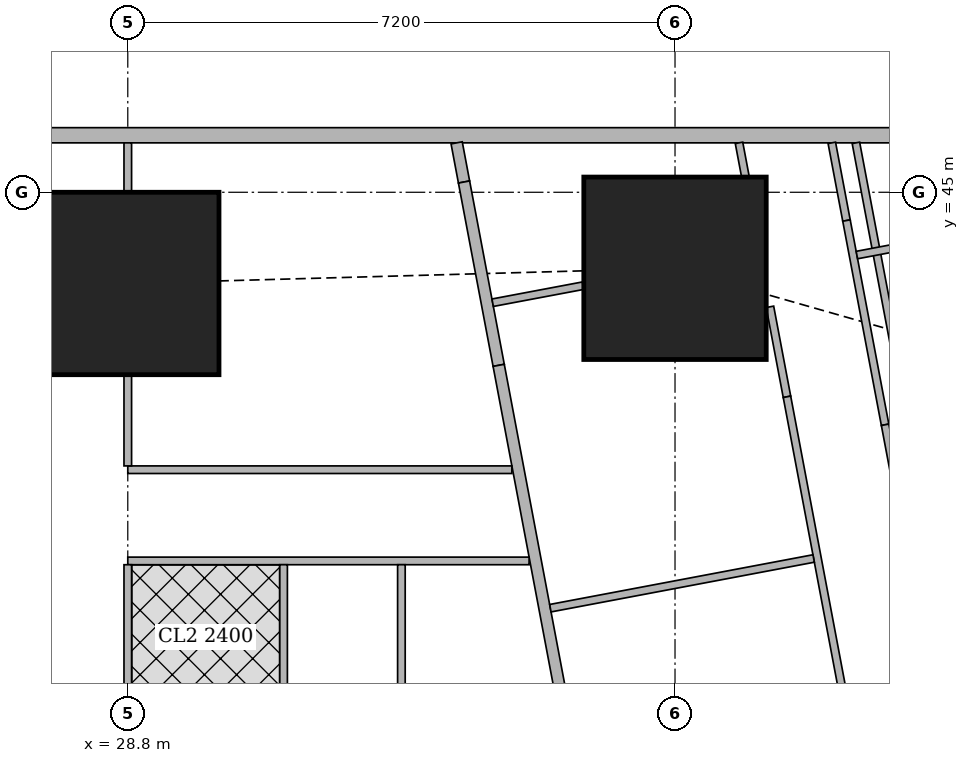
"""IFC4 building model, lengths in metres.
Left out: names, types, materials, properties, quantities, classifications, styles, units other than length and angle.
Written with IfcOpenShell. Run it as: python <this file> out.ifc"""

import sys

from ifc_helpers import new_model, si_unit, direction, frame, frame_2d, origin, origin_2d, place, context, subcontext, project, spatial, rectangle, extrude, element, fill, save


model = new_model("IFC4")
c1 = context("Model", 3, precision=1e-05, world=origin(), true_north=direction((0.0, 1.0)))
c2 = subcontext(c1, "Body", "Model", "MODEL_VIEW")
j1 = project(units=[si_unit("LENGTHUNIT", "METRE"), si_unit("PLANEANGLEUNIT", "RADIAN")], contexts=[c1])
p1 = place(None, origin())
s1 = spatial("IfcSite", under=j1, at=p1, CompositionType="ELEMENT")
p2 = place(p1, origin())
s2 = spatial("IfcBuilding", under=s1, at=p2, CompositionType="ELEMENT")
p3 = place(p2, frame((0.0, 0.0, 223.7)))
s3 = spatial("IfcBuildingStorey", under=s2, at=p3, CompositionType="ELEMENT", Elevation=223.7)
for number, where, z_axis, x_axis in (
    (1, (28.8, 43.8, 0.0), (0.0, 0.0, 1.0), (1.0, 0.0, 0.0)),
    (2, (36.0, 44.0, 0.0), (0.0, 0.0, 1.0), (1.0, 0.0, 0.0)),
):
    element("IfcColumn", number, at=place(p3, frame(where, z_axis=z_axis, x_axis=x_axis)), inside=s3, PredefinedType="COLUMN", context=c2, shape_type="SweptSolid", body=[
        extrude(rectangle(XDim=2.4, YDim=2.4, at=origin_2d()), origin(), (0.0, 0.0, 1.0), 3.75),
    ])
p4 = place(p3, frame((40.106, 45.75, 0.0), z_axis=(0.0, 0.0, 1.0), x_axis=(-1.0, 0.0, 0.0)))
e3 = element("IfcWall", 3, at=p4, inside=s3, PredefinedType="SOLIDWALL", context=c2, shape_type="SweptSolid", body=[
    extrude(rectangle(XDim=25.543, YDim=0.2, at=frame_2d((12.771, 0.0))), origin(), (0.0, 0.0, 1.0), 3.5),
])
p5 = place(p4, frame((8.606, 0.0, 0.9)))
e4 = element("IfcOpeningElement", 4, at=p5, cuts=e3, PredefinedType="OPENING", context=c2, shape_type="SweptSolid", body=[
    extrude(rectangle(XDim=1.8, YDim=1.5, at=frame_2d((0.9, 0.75))), frame((0.0, 0.11, 0.0), z_axis=(0.0, -1.0, 0.0), x_axis=(1.0, 0.0, 0.0)), (0.0, 0.0, 1.0), 0.22),
])
p6 = place(p4, frame((12.206, 0.0, 0.9)))
e5 = element("IfcOpeningElement", 5, at=p6, cuts=e3, PredefinedType="OPENING", context=c2, shape_type="SweptSolid", body=[
    extrude(rectangle(XDim=1.8, YDim=1.5, at=frame_2d((0.9, 0.75))), frame((0.0, 0.11, 0.0), z_axis=(0.0, -1.0, 0.0), x_axis=(1.0, 0.0, 0.0)), (0.0, 0.0, 1.0), 0.22),
])
p7 = place(p4, frame((15.806, 0.0, 0.9)))
e6 = element("IfcOpeningElement", 6, at=p7, cuts=e3, PredefinedType="OPENING", context=c2, shape_type="SweptSolid", body=[
    extrude(rectangle(XDim=1.8, YDim=1.5, at=frame_2d((0.9, 0.75))), frame((0.0, 0.11, 0.0), z_axis=(0.0, -1.0, 0.0), x_axis=(1.0, 0.0, 0.0)), (0.0, 0.0, 1.0), 0.22),
])
p8 = place(p4, frame((20.825, 0.0, 0.9)))
e7 = element("IfcOpeningElement", 7, at=p8, cuts=e3, PredefinedType="OPENING", context=c2, shape_type="SweptSolid", body=[
    extrude(rectangle(XDim=2.4, YDim=1.5, at=frame_2d((1.2, 0.75))), frame((0.0, 0.11, 0.0), z_axis=(0.0, -1.0, 0.0), x_axis=(1.0, 0.0, 0.0)), (0.0, 0.0, 1.0), 0.22),
])
p9 = place(p3, frame((33.127, 45.65, 0.0), z_axis=(0.0, 0.0, 1.0), x_axis=(0.185441815104, -0.982655246366, 0.0)))
e8 = element("IfcWall", 8, at=p9, inside=s3, PredefinedType="SOLIDWALL", context=c2, shape_type="SweptSolid", body=[
    extrude(rectangle(XDim=0.524, YDim=0.15, at=frame_2d((0.262, 0.0))), origin(), (0.0, 0.0, 1.0), 3.5),
])
p10 = place(p3, frame((33.224, 45.135, 0.0), z_axis=(0.0, 0.0, 1.0), x_axis=(0.185681462868, -0.982609990967, 0.0)))
e9 = element("IfcWall", 9, at=p10, inside=s3, PredefinedType="SOLIDWALL", context=c2, shape_type="SweptSolid", body=[
    extrude(rectangle(XDim=2.455, YDim=0.15, at=frame_2d((1.228, 0.0))), origin(), (0.0, 0.0, 1.0), 2.05),
])
p11 = place(p3, frame((33.68, 42.723, 0.0), z_axis=(0.0, 0.0, 1.0), x_axis=(0.185601160014, -0.982625162207, 0.0)))
e10 = element("IfcWall", 10, at=p11, inside=s3, PredefinedType="SOLIDWALL", context=c2, shape_type="SweptSolid", body=[
    extrude(rectangle(XDim=41.051, YDim=0.15, at=frame_2d((20.526, 0.0))), origin(), (0.0, 0.0, 1.0), 2.5),
])
p12 = place(p11, frame((16.123, 0.0, 0.0)))
e11 = element("IfcOpeningElement", 11, at=p12, cuts=e10, PredefinedType="OPENING", context=c2, shape_type="SweptSolid", body=[
    extrude(rectangle(XDim=1.0, YDim=2.1, at=frame_2d((0.5, 1.05))), frame((0.0, 0.085, 0.0), z_axis=(0.0, -1.0, 0.0), x_axis=(1.0, 0.0, 0.0)), (0.0, 0.0, 1.0), 0.17),
])
p13 = place(p11, frame((19.938, 0.0, 0.0)))
e12 = element("IfcOpeningElement", 12, at=p13, cuts=e10, PredefinedType="OPENING", context=c2, shape_type="SweptSolid", body=[
    extrude(rectangle(XDim=1.0, YDim=2.1, at=frame_2d((0.5, 1.05))), frame((0.0, 0.085, 0.0), z_axis=(0.0, -1.0, 0.0), x_axis=(1.0, 0.0, 0.0)), (0.0, 0.0, 1.0), 0.17),
])
p14 = place(p11, frame((30.902, 0.0, 0.0)))
e13 = element("IfcOpeningElement", 13, at=p14, cuts=e10, PredefinedType="OPENING", context=c2, shape_type="SweptSolid", body=[
    extrude(rectangle(XDim=1.0, YDim=2.1, at=frame_2d((0.5, 1.05))), frame((0.0, 0.085, 0.0), z_axis=(0.0, -1.0, 0.0), x_axis=(1.0, 0.0, 0.0)), (0.0, 0.0, 1.0), 0.17),
])
p15 = place(p3, frame((39.054, 42.085, 0.0), z_axis=(0.0, 0.0, 1.0), x_axis=(-0.185791584218, 0.982589175207, 0.0)))
e14 = element("IfcWall", 14, at=p15, inside=s3, PredefinedType="PARTITIONING", context=c2, shape_type="SweptSolid", body=[
    extrude(rectangle(XDim=3.628, YDim=0.1, at=frame_2d((1.814, 0.0))), origin(), (0.0, 0.0, 1.0), 2.05),
])
p16 = place(p3, frame((38.063, 45.65, 0.0), z_axis=(0.0, 0.0, 1.0), x_axis=(0.185677287841, -0.982610779902, 0.0)))
e15 = element("IfcWall", 15, at=p16, inside=s3, PredefinedType="PARTITIONING", context=c2, shape_type="SweptSolid", body=[
    extrude(rectangle(XDim=1.04, YDim=0.1, at=frame_2d((0.52, 0.0))), origin(), (0.0, 0.0, 1.0), 3.5),
])
p17 = place(p3, frame((38.256, 44.628, 0.0), z_axis=(0.0, 0.0, 1.0), x_axis=(0.185700639943, -0.982606366927, 0.0)))
e16 = element("IfcWall", 16, at=p17, inside=s3, PredefinedType="PARTITIONING", context=c2, shape_type="SweptSolid", body=[
    extrude(rectangle(XDim=2.735, YDim=0.1, at=frame_2d((1.367, 0.0))), origin(), (0.0, 0.0, 1.0), 2.05),
])
p18 = place(p3, frame((38.764, 41.941, 0.0), z_axis=(0.0, 0.0, 1.0), x_axis=(0.185512176227, -0.982641965556, 0.0)))
e17 = element("IfcWall", 17, at=p18, inside=s3, PredefinedType="PARTITIONING", context=c2, shape_type="SweptSolid", body=[
    extrude(rectangle(XDim=12.792, YDim=0.1, at=frame_2d((6.396, 0.0))), origin(), (0.0, 0.0, 1.0), 2.5),
])
p19 = place(p18, frame((11.35, 0.0, 0.0)))
e18 = element("IfcOpeningElement", 18, at=p19, cuts=e17, PredefinedType="OPENING", context=c2, shape_type="SweptSolid", body=[
    extrude(rectangle(XDim=0.9, YDim=2.1, at=frame_2d((0.45, 1.05))), frame((0.0, 0.06, 0.0), z_axis=(0.0, -1.0, 0.0), x_axis=(1.0, 0.0, 0.0)), (0.0, 0.0, 1.0), 0.12),
])
p20 = place(p18, frame((8.085, 0.0, 0.0)))
e19 = element("IfcOpeningElement", 19, at=p20, cuts=e17, PredefinedType="OPENING", context=c2, shape_type="SweptSolid", body=[
    extrude(rectangle(XDim=0.9, YDim=2.1, at=frame_2d((0.45, 1.05))), frame((0.0, 0.06, 0.0), z_axis=(0.0, -1.0, 0.0), x_axis=(1.0, 0.0, 0.0)), (0.0, 0.0, 1.0), 0.12),
])
p21 = place(p18, frame((3.7, 0.0, 0.0)))
e20 = element("IfcOpeningElement", 20, at=p21, cuts=e17, PredefinedType="OPENING", context=c2, shape_type="SweptSolid", body=[
    extrude(rectangle(XDim=0.9, YDim=2.1, at=frame_2d((0.45, 1.05))), frame((0.0, 0.06, 0.0), z_axis=(0.0, -1.0, 0.0), x_axis=(1.0, 0.0, 0.0)), (0.0, 0.0, 1.0), 0.12),
])
p22 = place(p3, frame((36.842, 45.65, 0.0), z_axis=(0.0, 0.0, 1.0), x_axis=(0.185407859198, -0.982661653748, 0.0)))
e21 = element("IfcWall", 21, at=p22, inside=s3, PredefinedType="PARTITIONING", context=c2, shape_type="SweptSolid", body=[
    extrude(rectangle(XDim=0.448, YDim=0.1, at=frame_2d((0.224, 0.0))), origin(), (0.0, 0.0, 1.0), 3.5),
])
p23 = place(p3, frame((37.249, 43.493, 0.0), z_axis=(0.0, 0.0, 1.0), x_axis=(0.185817643817, -0.982584247404, 0.0)))
e22 = element("IfcWall", 22, at=p23, inside=s3, PredefinedType="PARTITIONING", context=c2, shape_type="SweptSolid", body=[
    extrude(rectangle(XDim=1.205, YDim=0.1, at=frame_2d((0.603, 0.0))), origin(), (0.0, 0.0, 1.0), 2.05),
])
p24 = place(p3, frame((37.473, 42.309, 0.0), z_axis=(0.0, 0.0, 1.0), x_axis=(0.185570636839, -0.982630927024, 0.0)))
e23 = element("IfcWall", 23, at=p24, inside=s3, PredefinedType="PARTITIONING", context=c2, shape_type="SweptSolid", body=[
    extrude(rectangle(XDim=13.553, YDim=0.1, at=frame_2d((6.777, 0.0))), origin(), (0.0, 0.0, 1.0), 2.5),
])
p25 = place(p24, frame((12.128, 0.0, 0.0)))
e24 = element("IfcOpeningElement", 24, at=p25, cuts=e23, PredefinedType="OPENING", context=c2, shape_type="SweptSolid", body=[
    extrude(rectangle(XDim=0.9, YDim=2.1, at=frame_2d((0.45, 1.05))), frame((0.0, 0.06, 0.0), z_axis=(0.0, -1.0, 0.0), x_axis=(1.0, 0.0, 0.0)), (0.0, 0.0, 1.0), 0.12),
])
p26 = place(p24, frame((8.487, 0.0, 0.0)))
e25 = element("IfcOpeningElement", 25, at=p26, cuts=e23, PredefinedType="OPENING", context=c2, shape_type="SweptSolid", body=[
    extrude(rectangle(XDim=0.9, YDim=2.1, at=frame_2d((0.45, 1.05))), frame((0.0, 0.06, 0.0), z_axis=(0.0, -1.0, 0.0), x_axis=(1.0, 0.0, 0.0)), (0.0, 0.0, 1.0), 0.12),
])
p27 = place(p24, frame((2.853, 0.0, 0.0)))
e26 = element("IfcOpeningElement", 26, at=p27, cuts=e23, PredefinedType="OPENING", context=c2, shape_type="SweptSolid", body=[
    extrude(rectangle(XDim=0.9, YDim=2.1, at=frame_2d((0.45, 1.05))), frame((0.0, 0.06, 0.0), z_axis=(0.0, -1.0, 0.0), x_axis=(1.0, 0.0, 0.0)), (0.0, 0.0, 1.0), 0.12),
])
p28 = place(p24, frame((10.22, 0.0, 0.0)))
e27 = element("IfcOpeningElement", 27, at=p28, cuts=e23, PredefinedType="OPENING", context=c2, shape_type="SweptSolid", body=[
    extrude(rectangle(XDim=0.9, YDim=2.1, at=frame_2d((0.45, 1.05))), frame((0.0, 0.06, 0.0), z_axis=(0.0, -1.0, 0.0), x_axis=(1.0, 0.0, 0.0)), (0.0, 0.0, 1.0), 0.12),
])
p29 = place(p24, frame((5.819, 0.0, 0.0)))
e28 = element("IfcOpeningElement", 28, at=p29, cuts=e23, PredefinedType="OPENING", context=c2, shape_type="SweptSolid", body=[
    extrude(rectangle(XDim=0.9, YDim=2.1, at=frame_2d((0.45, 1.05))), frame((0.0, 0.06, 0.0), z_axis=(0.0, -1.0, 0.0), x_axis=(1.0, 0.0, 0.0)), (0.0, 0.0, 1.0), 0.12),
])
p30 = place(p3, frame((41.968, 44.85, 0.0), z_axis=(0.0, 0.0, 1.0), x_axis=(-0.98258614234, -0.185807623311, 0.0)))
e29 = element("IfcWall", 29, at=p30, inside=s3, PredefinedType="PARTITIONING", context=c2, shape_type="SweptSolid", body=[
    extrude(rectangle(XDim=3.638, YDim=0.1, at=frame_2d((1.819, 0.0))), origin(), (0.0, 0.0, 1.0), 2.05),
])
p31 = place(p3, frame((34.79, 43.771, 0.0), z_axis=(0.0, 0.0, 1.0), x_axis=(-0.982730261052, -0.18504387051, 0.0)))
e30 = element("IfcWall", 30, at=p31, inside=s3, PredefinedType="PARTITIONING", context=c2, shape_type="SweptSolid", body=[
    extrude(rectangle(XDim=1.21, YDim=0.1, at=frame_2d((0.605, 0.0))), origin(), (0.0, 0.0, 1.0), 2.05),
])
p32 = place(p3, frame((37.824, 40.182, 0.0), z_axis=(0.0, 0.0, 1.0), x_axis=(-0.982648794755, -0.185475998897, 0.0)))
e31 = element("IfcWall", 31, at=p32, inside=s3, PredefinedType="PARTITIONING", context=c2, shape_type="SweptSolid", body=[
    extrude(rectangle(XDim=3.525, YDim=0.1, at=frame_2d((1.763, 0.0))), origin(), (0.0, 0.0, 1.0), 3.5),
])
p33 = place(p3, frame((28.8, 41.35, 0.0), z_axis=(0.0, 0.0, 1.0), x_axis=(1.0, 0.0, 0.0)))
e32 = element("IfcWall", 32, at=p33, inside=s3, PredefinedType="PARTITIONING", context=c2, shape_type="SweptSolid", body=[
    extrude(rectangle(XDim=5.053, YDim=0.1, at=frame_2d((2.526, 0.0))), origin(), (0.0, 0.0, 1.0), 3.5),
])
p34 = place(p33, frame((1.25, 0.0, 0.0)))
e33 = element("IfcOpeningElement", 33, at=p34, cuts=e32, PredefinedType="OPENING", context=c2, shape_type="SweptSolid", body=[
    extrude(rectangle(XDim=0.9, YDim=2.1, at=frame_2d((0.45, 1.05))), frame((0.0, 0.06, 0.0), z_axis=(0.0, -1.0, 0.0), x_axis=(1.0, 0.0, 0.0)), (0.0, 0.0, 1.0), 0.12),
])
p35 = place(p3, frame((28.8, 40.15, 0.0), z_axis=(0.0, 0.0, 1.0), x_axis=(1.0, 0.0, 0.0)))
e34 = element("IfcWall", 34, at=p35, inside=s3, PredefinedType="PARTITIONING", context=c2, shape_type="SweptSolid", body=[
    extrude(rectangle(XDim=5.28, YDim=0.1, at=frame_2d((2.64, 0.0))), origin(), (0.0, 0.0, 1.0), 3.5),
])
p36 = place(p35, frame((0.575, 0.0, 0.0)))
e35 = element("IfcOpeningElement", 35, at=p36, cuts=e34, PredefinedType="OPENING", context=c2, shape_type="SweptSolid", body=[
    extrude(rectangle(XDim=0.9, YDim=2.1, at=frame_2d((0.45, 1.05))), frame((0.0, 0.06, 0.0), z_axis=(0.0, -1.0, 0.0), x_axis=(1.0, 0.0, 0.0)), (0.0, 0.0, 1.0), 0.12),
])
p37 = place(p35, frame((4.23, 0.0, 0.0)))
e36 = element("IfcOpeningElement", 36, at=p37, cuts=e34, PredefinedType="OPENING", context=c2, shape_type="SweptSolid", body=[
    extrude(rectangle(XDim=0.9, YDim=2.1, at=frame_2d((0.45, 1.05))), frame((0.0, 0.06, 0.0), z_axis=(0.0, -1.0, 0.0), x_axis=(1.0, 0.0, 0.0)), (0.0, 0.0, 1.0), 0.12),
])
p38 = place(p35, frame((2.375, 0.0, 0.0)))
e37 = element("IfcOpeningElement", 37, at=p38, cuts=e34, PredefinedType="OPENING", context=c2, shape_type="SweptSolid", body=[
    extrude(rectangle(XDim=0.9, YDim=2.1, at=frame_2d((0.45, 1.05))), frame((0.0, 0.06, 0.0), z_axis=(0.0, -1.0, 0.0), x_axis=(1.0, 0.0, 0.0)), (0.0, 0.0, 1.0), 0.12),
])
p39 = place(p3, frame((28.8, 41.4, 0.0), z_axis=(0.0, 0.0, 1.0), x_axis=(0.0, 1.0, 0.0)))
e38 = element("IfcWall", 38, at=p39, inside=s3, PredefinedType="PARTITIONING", context=c2, shape_type="SweptSolid", body=[
    extrude(rectangle(XDim=1.199, YDim=0.1, at=frame_2d((0.6, 0.0))), origin(), (0.0, 0.0, 1.0), 3.5),
])
p40 = place(p3, frame((28.8, 45.001, 0.0), z_axis=(0.0, 0.0, 1.0), x_axis=(0.0, 1.0, 0.0)))
e39 = element("IfcWall", 39, at=p40, inside=s3, PredefinedType="PARTITIONING", context=c2, shape_type="SweptSolid", body=[
    extrude(rectangle(XDim=0.649, YDim=0.1, at=frame_2d((0.324, 0.0))), origin(), (0.0, 0.0, 1.0), 3.5),
])
p41 = place(p3, frame((28.8, 38.201, 0.0), z_axis=(0.0, 0.0, 1.0), x_axis=(0.0, 1.0, 0.0)))
e40 = element("IfcWall", 40, at=p41, inside=s3, PredefinedType="PARTITIONING", context=c2, shape_type="SweptSolid", body=[
    extrude(rectangle(XDim=1.899, YDim=0.1, at=frame_2d((0.95, 0.0))), origin(), (0.0, 0.0, 1.0), 3.5),
])
for number, where, z_axis, x_axis in (
    (41, (32.4, 36.575, 0.0), (0.0, 0.0, 1.0), (0.0, 1.0, 0.0)),
    (42, (30.85, 36.575, 0.0), (0.0, 0.0, 1.0), (0.0, 1.0, 0.0)),
):
    element("IfcWall", number, at=place(p3, frame(where, z_axis=z_axis, x_axis=x_axis)), inside=s3, PredefinedType="PARTITIONING", context=c2, shape_type="SweptSolid", body=[
        extrude(rectangle(XDim=3.525, YDim=0.1, at=frame_2d((1.763, 0.0))), origin(), (0.0, 0.0, 1.0), 3.5),
    ])
p42 = place(p5, origin())
e43 = element("IfcWindow", 43, at=p42, inside=s3, PartitioningType="SINGLE_PANEL", PredefinedType="WINDOW", context=c2, shape_type="SweptSolid", body=[
    extrude(rectangle(XDim=1.8, YDim=1.5, at=frame_2d((0.9, 0.75))), frame((0.0, 0.03, 0.0), z_axis=(0.0, -1.0, 0.0), x_axis=(1.0, 0.0, 0.0)), (0.0, 0.0, 1.0), 0.06),
])
fill(e4, e43)
p43 = place(p6, origin())
e44 = element("IfcWindow", 44, at=p43, inside=s3, PartitioningType="SINGLE_PANEL", PredefinedType="WINDOW", context=c2, shape_type="SweptSolid", body=[
    extrude(rectangle(XDim=1.8, YDim=1.5, at=frame_2d((0.9, 0.75))), frame((0.0, 0.03, 0.0), z_axis=(0.0, -1.0, 0.0), x_axis=(1.0, 0.0, 0.0)), (0.0, 0.0, 1.0), 0.06),
])
fill(e5, e44)
p44 = place(p27, origin())
e45 = element("IfcDoor", 45, at=p44, inside=s3, OperationType="SINGLE_SWING_LEFT", PredefinedType="DOOR", context=c2, shape_type="SweptSolid", body=[
    extrude(rectangle(XDim=0.9, YDim=2.1, at=frame_2d((0.45, 1.05))), frame((0.0, 0.025, 0.0), z_axis=(0.0, -1.0, 0.0), x_axis=(1.0, 0.0, 0.0)), (0.0, 0.0, 1.0), 0.05),
])
fill(e26, e45)
p45 = place(p34, origin())
e46 = element("IfcDoor", 46, at=p45, inside=s3, OperationType="SINGLE_SWING_RIGHT", PredefinedType="DOOR", context=c2, shape_type="SweptSolid", body=[
    extrude(rectangle(XDim=0.9, YDim=2.1, at=frame_2d((0.45, 1.05))), frame((0.0, 0.025, 0.0), z_axis=(0.0, -1.0, 0.0), x_axis=(1.0, 0.0, 0.0)), (0.0, 0.0, 1.0), 0.05),
])
fill(e33, e46)
p46 = place(p36, origin())
e47 = element("IfcDoor", 47, at=p46, inside=s3, OperationType="SINGLE_SWING_RIGHT", PredefinedType="DOOR", context=c2, shape_type="SweptSolid", body=[
    extrude(rectangle(XDim=0.9, YDim=2.1, at=frame_2d((0.45, 1.05))), frame((0.0, 0.025, 0.0), z_axis=(0.0, -1.0, 0.0), x_axis=(1.0, 0.0, 0.0)), (0.0, 0.0, 1.0), 0.05),
])
fill(e35, e47)
p47 = place(p37, origin())
e48 = element("IfcDoor", 48, at=p47, inside=s3, OperationType="SINGLE_SWING_LEFT", PredefinedType="DOOR", context=c2, shape_type="SweptSolid", body=[
    extrude(rectangle(XDim=0.9, YDim=2.1, at=frame_2d((0.45, 1.05))), frame((0.0, 0.025, 0.0), z_axis=(0.0, -1.0, 0.0), x_axis=(1.0, 0.0, 0.0)), (0.0, 0.0, 1.0), 0.05),
])
fill(e36, e48)
p48 = place(p38, origin())
e49 = element("IfcDoor", 49, at=p48, inside=s3, OperationType="SINGLE_SWING_LEFT", PredefinedType="DOOR", context=c2, shape_type="SweptSolid", body=[
    extrude(rectangle(XDim=0.9, YDim=2.1, at=frame_2d((0.45, 1.05))), frame((0.0, 0.025, 0.0), z_axis=(0.0, -1.0, 0.0), x_axis=(1.0, 0.0, 0.0)), (0.0, 0.0, 1.0), 0.05),
])
fill(e37, e49)
save(model, sys.argv[1])
